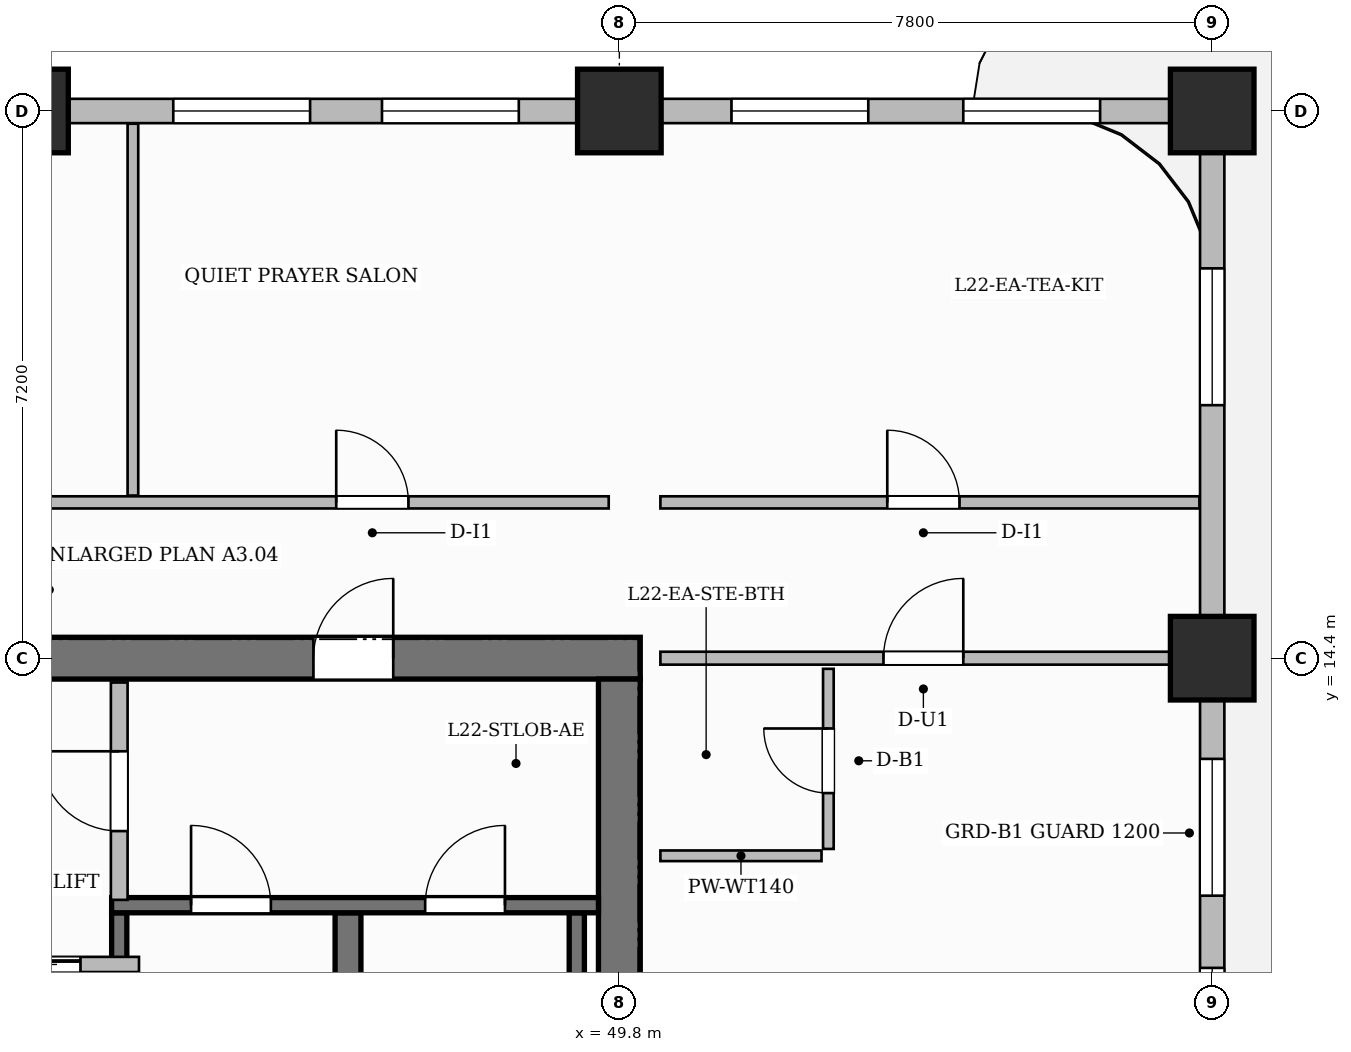
"""IFC4 building model, lengths in metres.
Left out: names, types, materials, properties, quantities, classifications, styles, units other than length and angle.
Written with IfcOpenShell. Run it as: python <this file> out.ifc"""

import sys

from ifc_helpers import new_model, si_unit, direction, frame, frame_2d, origin, origin_2d, place, context, subcontext, project, spatial, rectangle, extrude, source, transform, mapped, element, fill, save


model = new_model("IFC4")
c1 = context("Model", 3, precision=1e-05, world=origin(), true_north=direction((0.0, 1.0)))
c2 = subcontext(c1, "Body", "Model", "MODEL_VIEW")
j1 = project(units=[si_unit("LENGTHUNIT", "METRE"), si_unit("PLANEANGLEUNIT", "RADIAN")], contexts=[c1])
p1 = place(None, origin())
s1 = spatial("IfcSite", under=j1, at=p1, CompositionType="ELEMENT")
p2 = place(p1, origin())
s2 = spatial("IfcBuilding", under=s1, at=p2, CompositionType="ELEMENT")
p3 = place(p2, frame((0.0, 0.0, 91.6)))
s3 = spatial("IfcBuildingStorey", under=s2, at=p3, CompositionType="ELEMENT", Elevation=91.6)
p4 = place(p3, frame((34.525, 14.4, 0.0), z_axis=(0.0, 0.0, 1.0), x_axis=(1.0, 0.0, 0.0)))
e1 = element("IfcWall", 1, at=p4, inside=s3, PredefinedType="SHEAR", context=c2, shape_type="SweptSolid", body=[
    extrude(rectangle(XDim=15.55, YDim=0.55, at=frame_2d((7.775, 0.0))), origin(), (0.0, 0.0, 1.0), 3.7),
])
p5 = place(p4, frame((5.405, 0.0, 0.0)))
e2 = element("IfcOpeningElement", 2, at=p5, cuts=e1, PredefinedType="OPENING", context=c2, shape_type="SweptSolid", body=[
    extrude(rectangle(XDim=1.5, YDim=2.2, at=frame_2d((0.75, 1.1))), frame((0.0, 0.285, 0.0), z_axis=(0.0, -1.0, 0.0), x_axis=(1.0, 0.0, 0.0)), (0.0, 0.0, 1.0), 0.57),
])
p6 = place(p4, frame((1.62, 0.0, 0.0)))
e3 = element("IfcOpeningElement", 3, at=p6, cuts=e1, PredefinedType="OPENING", context=c2, shape_type="SweptSolid", body=[
    extrude(rectangle(XDim=1.05, YDim=2.15, at=frame_2d((0.525, 1.075))), frame((0.0, 0.285, 0.0), z_axis=(0.0, -1.0, 0.0), x_axis=(1.0, 0.0, 0.0)), (0.0, 0.0, 1.0), 0.57),
])
p7 = place(p4, frame((11.25, 0.0, 0.0)))
e4 = element("IfcOpeningElement", 4, at=p7, cuts=e1, PredefinedType="OPENING", context=c2, shape_type="SweptSolid", body=[
    extrude(rectangle(XDim=1.05, YDim=2.15, at=frame_2d((0.525, 1.075))), frame((0.0, 0.285, 0.0), z_axis=(0.0, -1.0, 0.0), x_axis=(1.0, 0.0, 0.0)), (0.0, 0.0, 1.0), 0.57),
])
p8 = place(p3, frame((49.8, 3.875, 0.0), z_axis=(0.0, 0.0, 1.0), x_axis=(0.0, 1.0, 0.0)))
e5 = element("IfcWall", 5, at=p8, inside=s3, PredefinedType="SHEAR", context=c2, shape_type="SweptSolid", body=[
    extrude(rectangle(XDim=10.25, YDim=0.55, at=frame_2d((5.125, 0.0))), origin(), (0.0, 0.0, 1.0), 3.7),
])
m1 = source(origin(), c2, "Body", "SweptSolid", [
    extrude(rectangle(XDim=1.1, YDim=1.1, at=origin_2d()), origin(), (0.0, 0.0, 1.0), 3.7),
])
for number, where, z_axis, x_axis in (
    (6, (42.0, 21.6, 0.0), (0.0, 0.0, 1.0), (1.0, 0.0, 0.0)),
    (7, (49.8, 21.6, 0.0), (0.0, 0.0, 1.0), (1.0, 0.0, 0.0)),
    (8, (57.6, 14.4, 0.0), (0.0, 0.0, 1.0), (1.0, 0.0, 0.0)),
    (9, (57.6, 21.6, 0.0), (0.0, 0.0, 1.0), (1.0, 0.0, 0.0)),
):
    element("IfcColumn", number, at=place(p3, frame(where, z_axis=z_axis, x_axis=x_axis)), inside=s3, PredefinedType="COLUMN", context=c2, shape_type="MappedRepresentation", body=[
        mapped(m1, transform((0.0, 0.0, 0.0), scale=1.0)),
    ])
p9 = place(p3, frame((43.22, 4.1, 0.0), z_axis=(0.0, 0.0, 1.0), x_axis=(0.0, 1.0, 0.0)))
e10 = element("IfcWall", 10, at=p9, inside=s3, PredefinedType="SHEAR", context=c2, shape_type="SweptSolid", body=[
    extrude(rectangle(XDim=6.95, YDim=0.2, at=frame_2d((3.475, 0.0))), origin(), (0.0, 0.0, 1.0), 3.7),
])
p10 = place(p3, frame((46.23, 4.1, 0.0), z_axis=(0.0, 0.0, 1.0), x_axis=(0.0, 1.0, 0.0)))
e11 = element("IfcWall", 11, at=p10, inside=s3, PredefinedType="SHEAR", context=c2, shape_type="SweptSolid", body=[
    extrude(rectangle(XDim=6.95, YDim=0.34, at=frame_2d((3.475, 0.0))), origin(), (0.0, 0.0, 1.0), 3.7),
])
p11 = place(p3, frame((49.24, 4.1, 0.0), z_axis=(0.0, 0.0, 1.0), x_axis=(0.0, 1.0, 0.0)))
e12 = element("IfcWall", 12, at=p11, inside=s3, PredefinedType="SHEAR", context=c2, shape_type="SweptSolid", body=[
    extrude(rectangle(XDim=6.95, YDim=0.2, at=frame_2d((3.475, 0.0))), origin(), (0.0, 0.0, 1.0), 3.7),
])
p12 = place(p3, frame((43.12, 11.15, 0.0), z_axis=(0.0, 0.0, 1.0), x_axis=(1.0, 0.0, 0.0)))
e13 = element("IfcWall", 13, at=p12, inside=s3, PredefinedType="SHEAR", context=c2, shape_type="SweptSolid", body=[
    extrude(rectangle(XDim=6.405, YDim=0.2, at=frame_2d((3.202, 0.0))), origin(), (0.0, 0.0, 1.0), 3.7),
])
p13 = place(p12, frame((1.045, 0.0, 0.0)))
e14 = element("IfcOpeningElement", 14, at=p13, cuts=e13, PredefinedType="OPENING", context=c2, shape_type="SweptSolid", body=[
    extrude(rectangle(XDim=1.05, YDim=2.2, at=frame_2d((0.525, 1.1))), frame((0.0, 0.11, 0.0), z_axis=(0.0, -1.0, 0.0), x_axis=(1.0, 0.0, 0.0)), (0.0, 0.0, 1.0), 0.22),
])
p14 = place(p12, frame((4.125, 0.0, 0.0)))
e15 = element("IfcOpeningElement", 15, at=p14, cuts=e13, PredefinedType="OPENING", context=c2, shape_type="SweptSolid", body=[
    extrude(rectangle(XDim=1.05, YDim=2.2, at=frame_2d((0.525, 1.1))), frame((0.0, 0.11, 0.0), z_axis=(0.0, -1.0, 0.0), x_axis=(1.0, 0.0, 0.0)), (0.0, 0.0, 1.0), 0.22),
])
p15 = place(p3, frame((43.22, 11.22, 0.0), z_axis=(0.0, 0.0, 1.0), x_axis=(0.0, 1.0, 0.0)))
e16 = element("IfcWall", 16, at=p15, inside=s3, PredefinedType="PARTITIONING", context=c2, shape_type="SweptSolid", body=[
    extrude(rectangle(XDim=2.86, YDim=0.22, at=frame_2d((1.43, 0.0))), origin(), (0.0, 0.0, 1.0), 3.45),
])
p16 = place(p15, frame((0.905, 0.0, 0.0)))
e17 = element("IfcOpeningElement", 17, at=p16, cuts=e16, PredefinedType="OPENING", context=c2, shape_type="SweptSolid", body=[
    extrude(rectangle(XDim=1.05, YDim=2.15, at=frame_2d((0.525, 1.075))), frame((0.0, 0.12, 0.0), z_axis=(0.0, -1.0, 0.0), x_axis=(1.0, 0.0, 0.0)), (0.0, 0.0, 1.0), 0.24),
])
p17 = place(p3, frame((32.19, 16.45, 0.0), z_axis=(0.0, 0.0, 1.0), x_axis=(1.0, 0.0, 0.0)))
e18 = element("IfcWall", 18, at=p17, inside=s3, PredefinedType="PARTITIONING", context=c2, shape_type="SweptSolid", body=[
    extrude(rectangle(XDim=17.47, YDim=0.16, at=frame_2d((8.735, 0.0))), origin(), (0.0, 0.0, 1.0), 3.45),
])
p18 = place(p17, frame((1.235, 0.0, 0.0)))
e19 = element("IfcOpeningElement", 19, at=p18, cuts=e18, PredefinedType="OPENING", context=c2, shape_type="SweptSolid", body=[
    extrude(rectangle(XDim=0.85, YDim=2.1, at=frame_2d((0.425, 1.05))), frame((0.0, 0.09, 0.0), z_axis=(0.0, -1.0, 0.0), x_axis=(1.0, 0.0, 0.0)), (0.0, 0.0, 1.0), 0.18),
])
p19 = place(p17, frame((6.61, 0.0, 0.0)))
e20 = element("IfcOpeningElement", 20, at=p19, cuts=e18, PredefinedType="OPENING", context=c2, shape_type="SweptSolid", body=[
    extrude(rectangle(XDim=1.4, YDim=2.35, at=frame_2d((0.7, 1.175))), frame((0.0, 0.09, 0.0), z_axis=(0.0, -1.0, 0.0), x_axis=(1.0, 0.0, 0.0)), (0.0, 0.0, 1.0), 0.18),
])
p20 = place(p17, frame((13.885, 0.0, 0.0)))
e21 = element("IfcOpeningElement", 21, at=p20, cuts=e18, PredefinedType="OPENING", context=c2, shape_type="SweptSolid", body=[
    extrude(rectangle(XDim=0.95, YDim=2.15, at=frame_2d((0.475, 1.075))), frame((0.0, 0.09, 0.0), z_axis=(0.0, -1.0, 0.0), x_axis=(1.0, 0.0, 0.0)), (0.0, 0.0, 1.0), 0.18),
])
p21 = place(p3, frame((50.34, 14.4, 0.0), z_axis=(0.0, 0.0, 1.0), x_axis=(1.0, 0.0, 0.0)))
e22 = element("IfcWall", 22, at=p21, inside=s3, PredefinedType="PARTITIONING", context=c2, shape_type="SweptSolid", body=[
    extrude(rectangle(XDim=7.07, YDim=0.17, at=frame_2d((3.535, 0.0))), origin(), (0.0, 0.0, 1.0), 2.885),
])
p22 = place(p21, frame((2.935, 0.0, 0.0)))
e23 = element("IfcOpeningElement", 23, at=p22, cuts=e22, PredefinedType="OPENING", context=c2, shape_type="SweptSolid", body=[
    extrude(rectangle(XDim=1.05, YDim=2.25, at=frame_2d((0.525, 1.125))), frame((0.0, 0.095, 0.0), z_axis=(0.0, -1.0, 0.0), x_axis=(1.0, 0.0, 0.0)), (0.0, 0.0, 1.0), 0.19),
])
p23 = place(p3, frame((50.34, 16.45, 0.0), z_axis=(0.0, 0.0, 1.0), x_axis=(1.0, 0.0, 0.0)))
e24 = element("IfcWall", 24, at=p23, inside=s3, PredefinedType="PARTITIONING", context=c2, shape_type="SweptSolid", body=[
    extrude(rectangle(XDim=7.092, YDim=0.16, at=frame_2d((3.546, 0.0))), origin(), (0.0, 0.0, 1.0), 3.45),
])
p24 = place(p23, frame((2.985, 0.0, 0.0)))
e25 = element("IfcOpeningElement", 25, at=p24, cuts=e24, PredefinedType="OPENING", context=c2, shape_type="SweptSolid", body=[
    extrude(rectangle(XDim=0.95, YDim=2.15, at=frame_2d((0.475, 1.075))), frame((0.0, 0.09, 0.0), z_axis=(0.0, -1.0, 0.0), x_axis=(1.0, 0.0, 0.0)), (0.0, 0.0, 1.0), 0.18),
])
p25 = place(p3, frame((52.55, 11.89, 0.0), z_axis=(0.0, 0.0, 1.0), x_axis=(0.0, 1.0, 0.0)))
e26 = element("IfcWall", 26, at=p25, inside=s3, PredefinedType="PARTITIONING", context=c2, shape_type="SweptSolid", body=[
    extrude(rectangle(XDim=2.37, YDim=0.14, at=frame_2d((1.185, 0.0))), origin(), (0.0, 0.0, 1.0), 3.45),
])
p26 = place(p25, frame((0.735, 0.0, 0.0)))
e27 = element("IfcOpeningElement", 27, at=p26, cuts=e26, PredefinedType="OPENING", context=c2, shape_type="SweptSolid", body=[
    extrude(rectangle(XDim=0.85, YDim=2.1, at=frame_2d((0.425, 1.05))), frame((0.0, 0.08, 0.0), z_axis=(0.0, -1.0, 0.0), x_axis=(1.0, 0.0, 0.0)), (0.0, 0.0, 1.0), 0.16),
])
p27 = place(p3, frame((50.34, 11.8, 0.0), z_axis=(0.0, 0.0, 1.0), x_axis=(1.0, 0.0, 0.0)))
e28 = element("IfcWall", 28, at=p27, inside=s3, PredefinedType="PARTITIONING", context=c2, shape_type="SweptSolid", body=[
    extrude(rectangle(XDim=2.12, YDim=0.14, at=frame_2d((1.06, 0.0))), origin(), (0.0, 0.0, 1.0), 3.45),
])
p28 = place(p3, frame((43.4, 16.54, 0.0), z_axis=(0.0, 0.0, 1.0), x_axis=(0.0, 1.0, 0.0)))
e29 = element("IfcWall", 29, at=p28, inside=s3, PredefinedType="PARTITIONING", context=c2, shape_type="SweptSolid", body=[
    extrude(rectangle(XDim=4.892, YDim=0.14, at=frame_2d((2.446, 0.0))), origin(), (0.0, 0.0, 1.0), 3.45),
])
p29 = place(p3, frame((40.84, 10.37, 0.0), z_axis=(0.0, 0.0, 1.0), x_axis=(1.0, 0.0, 0.0)))
e30 = element("IfcWall", 30, at=p29, inside=s3, PredefinedType="PARTITIONING", context=c2, shape_type="SweptSolid", body=[
    extrude(rectangle(XDim=2.64, YDim=0.2, at=frame_2d((1.32, 0.0))), origin(), (0.0, 0.0, 1.0), 3.45),
])
p30 = place(p29, frame((0.77, 0.0, 0.0)))
e31 = element("IfcOpeningElement", 31, at=p30, cuts=e30, PredefinedType="OPENING", context=c2, shape_type="SweptSolid", body=[
    extrude(rectangle(XDim=1.1, YDim=2.2, at=frame_2d((0.55, 1.1))), frame((0.0, 0.11, 0.0), z_axis=(0.0, -1.0, 0.0), x_axis=(1.0, 0.0, 0.0)), (0.0, 0.0, 1.0), 0.22),
])
p31 = place(p3, frame((57.6, 0.05, 0.0), z_axis=(0.0, 0.0, 1.0), x_axis=(0.0, 1.0, 0.0)))
e32 = element("IfcWall", 32, at=p31, inside=s3, PredefinedType="SOLIDWALL", context=c2, shape_type="SweptSolid", body=[
    extrude(rectangle(XDim=21.5, YDim=0.32, at=frame_2d((10.75, 0.0))), origin(), (0.0, 0.0, 1.0), 2.885),
])
p32 = place(p31, frame((3.4, 0.0, 0.0)))
e33 = element("IfcOpeningElement", 33, at=p32, cuts=e32, PredefinedType="OPENING", context=c2, shape_type="SweptSolid", body=[
    extrude(rectangle(XDim=1.2, YDim=2.2, at=frame_2d((0.6, 1.1))), frame((0.0, 0.17, 0.0), z_axis=(0.0, -1.0, 0.0), x_axis=(1.0, 0.0, 0.0)), (0.0, 0.0, 1.0), 0.34),
])
p33 = place(p31, frame((1.225, 0.0, 0.8)))
e34 = element("IfcOpeningElement", 34, at=p33, cuts=e32, PredefinedType="OPENING", context=c2, shape_type="SweptSolid", body=[
    extrude(rectangle(XDim=1.4, YDim=1.85, at=frame_2d((0.7, 0.925))), frame((0.0, 0.17, 0.0), z_axis=(0.0, -1.0, 0.0), x_axis=(1.0, 0.0, 0.0)), (0.0, 0.0, 1.0), 0.34),
])
p34 = place(p31, frame((5.15, 0.0, 0.8)))
e35 = element("IfcOpeningElement", 35, at=p34, cuts=e32, PredefinedType="OPENING", context=c2, shape_type="SweptSolid", body=[
    extrude(rectangle(XDim=0.95, YDim=1.75, at=frame_2d((0.475, 0.875))), frame((0.0, 0.17, 0.0), z_axis=(0.0, -1.0, 0.0), x_axis=(1.0, 0.0, 0.0)), (0.0, 0.0, 1.0), 0.34),
])
p35 = place(p31, frame((8.475, 0.0, 0.8)))
e36 = element("IfcOpeningElement", 36, at=p35, cuts=e32, PredefinedType="OPENING", context=c2, shape_type="SweptSolid", body=[
    extrude(rectangle(XDim=1.8, YDim=1.85, at=frame_2d((0.9, 0.925))), frame((0.0, 0.17, 0.0), z_axis=(0.0, -1.0, 0.0), x_axis=(1.0, 0.0, 0.0)), (0.0, 0.0, 1.0), 0.34),
])
p36 = place(p31, frame((11.225, 0.0, 0.8)))
e37 = element("IfcOpeningElement", 37, at=p36, cuts=e32, PredefinedType="OPENING", context=c2, shape_type="SweptSolid", body=[
    extrude(rectangle(XDim=1.8, YDim=1.85, at=frame_2d((0.9, 0.925))), frame((0.0, 0.17, 0.0), z_axis=(0.0, -1.0, 0.0), x_axis=(1.0, 0.0, 0.0)), (0.0, 0.0, 1.0), 0.34),
])
p37 = place(p31, frame((17.679, 0.0, 0.8)))
e38 = element("IfcOpeningElement", 38, at=p37, cuts=e32, PredefinedType="OPENING", context=c2, shape_type="SweptSolid", body=[
    extrude(rectangle(XDim=1.8, YDim=1.85, at=frame_2d((0.9, 0.925))), frame((0.0, 0.17, 0.0), z_axis=(0.0, -1.0, 0.0), x_axis=(1.0, 0.0, 0.0)), (0.0, 0.0, 1.0), 0.34),
])
p38 = place(p3, frame((34.8, 21.6, 0.0), z_axis=(0.0, 0.0, 1.0), x_axis=(1.0, 0.0, 0.0)))
e39 = element("IfcWall", 39, at=p38, inside=s3, PredefinedType="SOLIDWALL", context=c2, shape_type="SweptSolid", body=[
    extrude(rectangle(XDim=22.8, YDim=0.32, at=frame_2d((11.4, 0.0))), origin(), (0.0, 0.0, 1.0), 2.885),
])
p39 = place(p38, frame((1.331, 0.0, 0.8)))
e40 = element("IfcOpeningElement", 40, at=p39, cuts=e39, PredefinedType="OPENING", context=c2, shape_type="SweptSolid", body=[
    extrude(rectangle(XDim=1.8, YDim=1.85, at=frame_2d((0.9, 0.925))), frame((0.0, 0.17, 0.0), z_axis=(0.0, -1.0, 0.0), x_axis=(1.0, 0.0, 0.0)), (0.0, 0.0, 1.0), 0.34),
])
p40 = place(p38, frame((4.077, 0.0, 0.8)))
e41 = element("IfcOpeningElement", 41, at=p40, cuts=e39, PredefinedType="OPENING", context=c2, shape_type="SweptSolid", body=[
    extrude(rectangle(XDim=1.8, YDim=1.85, at=frame_2d((0.9, 0.925))), frame((0.0, 0.17, 0.0), z_axis=(0.0, -1.0, 0.0), x_axis=(1.0, 0.0, 0.0)), (0.0, 0.0, 1.0), 0.34),
])
p41 = place(p38, frame((9.131, 0.0, 0.8)))
e42 = element("IfcOpeningElement", 42, at=p41, cuts=e39, PredefinedType="OPENING", context=c2, shape_type="SweptSolid", body=[
    extrude(rectangle(XDim=1.8, YDim=1.85, at=frame_2d((0.9, 0.925))), frame((0.0, 0.17, 0.0), z_axis=(0.0, -1.0, 0.0), x_axis=(1.0, 0.0, 0.0)), (0.0, 0.0, 1.0), 0.34),
])
p42 = place(p38, frame((11.877, 0.0, 0.8)))
e43 = element("IfcOpeningElement", 43, at=p42, cuts=e39, PredefinedType="OPENING", context=c2, shape_type="SweptSolid", body=[
    extrude(rectangle(XDim=1.8, YDim=1.85, at=frame_2d((0.9, 0.925))), frame((0.0, 0.17, 0.0), z_axis=(0.0, -1.0, 0.0), x_axis=(1.0, 0.0, 0.0)), (0.0, 0.0, 1.0), 0.34),
])
p43 = place(p38, frame((16.475, 0.0, 0.8)))
e44 = element("IfcOpeningElement", 44, at=p43, cuts=e39, PredefinedType="OPENING", context=c2, shape_type="SweptSolid", body=[
    extrude(rectangle(XDim=1.8, YDim=1.85, at=frame_2d((0.9, 0.925))), frame((0.0, 0.17, 0.0), z_axis=(0.0, -1.0, 0.0), x_axis=(1.0, 0.0, 0.0)), (0.0, 0.0, 1.0), 0.34),
])
p44 = place(p38, frame((19.525, 0.0, 0.8)))
e45 = element("IfcOpeningElement", 45, at=p44, cuts=e39, PredefinedType="OPENING", context=c2, shape_type="SweptSolid", body=[
    extrude(rectangle(XDim=1.8, YDim=1.85, at=frame_2d((0.9, 0.925))), frame((0.0, 0.17, 0.0), z_axis=(0.0, -1.0, 0.0), x_axis=(1.0, 0.0, 0.0)), (0.0, 0.0, 1.0), 0.34),
])
m2 = source(origin(), c2, "Body", "SweptSolid", [
    extrude(rectangle(XDim=1.05, YDim=2.2, at=frame_2d((0.525, 1.1))), frame((0.0, 0.025, 0.0), z_axis=(0.0, -1.0, 0.0), x_axis=(1.0, 0.0, 0.0)), (0.0, 0.0, 1.0), 0.05),
])
p45 = place(p13, origin())
e46 = element("IfcDoor", 46, at=p45, inside=s3, OperationType="SINGLE_SWING_LEFT", PredefinedType="DOOR", context=c2, shape_type="MappedRepresentation", body=[
    mapped(m2, transform((0.0, 0.0, 0.0), scale=1.0)),
])
fill(e14, e46)
p46 = place(p14, origin())
e47 = element("IfcDoor", 47, at=p46, inside=s3, OperationType="SINGLE_SWING_RIGHT", PredefinedType="DOOR", context=c2, shape_type="MappedRepresentation", body=[
    mapped(m2, transform((0.0, 0.0, 0.0), scale=1.0)),
])
fill(e15, e47)
m3 = source(origin(), c2, "Body", "SweptSolid", [
    extrude(rectangle(XDim=1.05, YDim=2.15, at=frame_2d((0.525, 1.075))), frame((0.0, 0.025, 0.0), z_axis=(0.0, -1.0, 0.0), x_axis=(1.0, 0.0, 0.0)), (0.0, 0.0, 1.0), 0.05),
])
p47 = place(p16, origin())
e48 = element("IfcDoor", 48, at=p47, inside=s3, OperationType="SINGLE_SWING_RIGHT", PredefinedType="DOOR", context=c2, shape_type="MappedRepresentation", body=[
    mapped(m3, transform((0.0, 0.0, 0.0), scale=1.0)),
])
fill(e17, e48)
p48 = place(p7, origin())
e49 = element("IfcDoor", 49, at=p48, inside=s3, OperationType="SINGLE_SWING_RIGHT", PredefinedType="DOOR", context=c2, shape_type="MappedRepresentation", body=[
    mapped(m3, transform((0.0, 0.0, 0.0), scale=1.0)),
])
fill(e4, e49)
m4 = source(origin(), c2, "Body", "SweptSolid", [
    extrude(rectangle(XDim=1.05, YDim=2.25, at=frame_2d((0.525, 1.125))), frame((0.0, 0.025, 0.0), z_axis=(0.0, -1.0, 0.0), x_axis=(1.0, 0.0, 0.0)), (0.0, 0.0, 1.0), 0.05),
])
p49 = place(p22, origin())
e50 = element("IfcDoor", 50, at=p49, inside=s3, OperationType="SINGLE_SWING_RIGHT", PredefinedType="DOOR", context=c2, shape_type="MappedRepresentation", body=[
    mapped(m4, transform((0.0, 0.0, 0.0), scale=1.0)),
])
fill(e23, e50)
m5 = source(origin(), c2, "Body", "SweptSolid", [
    extrude(rectangle(XDim=0.95, YDim=2.15, at=frame_2d((0.475, 1.075))), frame((0.0, 0.025, 0.0), z_axis=(0.0, -1.0, 0.0), x_axis=(1.0, 0.0, 0.0)), (0.0, 0.0, 1.0), 0.05),
])
p50 = place(p24, origin())
e51 = element("IfcDoor", 51, at=p50, inside=s3, OperationType="SINGLE_SWING_LEFT", PredefinedType="DOOR", context=c2, shape_type="MappedRepresentation", body=[
    mapped(m5, transform((0.0, 0.0, 0.0), scale=1.0)),
])
fill(e25, e51)
m6 = source(origin(), c2, "Body", "SweptSolid", [
    extrude(rectangle(XDim=0.85, YDim=2.1, at=frame_2d((0.425, 1.05))), frame((0.0, 0.025, 0.0), z_axis=(0.0, -1.0, 0.0), x_axis=(1.0, 0.0, 0.0)), (0.0, 0.0, 1.0), 0.05),
])
p51 = place(p26, origin())
e52 = element("IfcDoor", 52, at=p51, inside=s3, OperationType="SINGLE_SWING_RIGHT", PredefinedType="DOOR", context=c2, shape_type="MappedRepresentation", body=[
    mapped(m6, transform((0.0, 0.0, 0.0), scale=1.0)),
])
fill(e27, e52)
p52 = place(p20, origin())
e53 = element("IfcDoor", 53, at=p52, inside=s3, OperationType="SINGLE_SWING_LEFT", PredefinedType="DOOR", context=c2, shape_type="MappedRepresentation", body=[
    mapped(m5, transform((0.0, 0.0, 0.0), scale=1.0)),
])
fill(e21, e53)
m7 = source(origin(), c2, "Body", "SweptSolid", [
    extrude(rectangle(XDim=1.1, YDim=2.2, at=frame_2d((0.55, 1.1))), frame((0.0, 0.025, 0.0), z_axis=(0.0, -1.0, 0.0), x_axis=(1.0, 0.0, 0.0)), (0.0, 0.0, 1.0), 0.05),
])
p53 = place(p30, origin())
e54 = element("IfcDoor", 54, at=p53, inside=s3, OperationType="SLIDING_TO_LEFT", PredefinedType="DOOR", context=c2, shape_type="MappedRepresentation", body=[
    mapped(m7, transform((0.0, 0.0, 0.0), scale=1.0)),
])
fill(e31, e54)
m8 = source(origin(), c2, "Body", "SweptSolid", [
    extrude(rectangle(XDim=1.8, YDim=1.85, at=frame_2d((0.9, 0.925))), frame((0.0, 0.03, 0.0), z_axis=(0.0, -1.0, 0.0), x_axis=(1.0, 0.0, 0.0)), (0.0, 0.0, 1.0), 0.06),
])
p54 = place(p35, origin())
e55 = element("IfcWindow", 55, at=p54, inside=s3, PartitioningType="DOUBLE_PANEL_VERTICAL", PredefinedType="WINDOW", context=c2, shape_type="MappedRepresentation", body=[
    mapped(m8, transform((0.0, 0.0, 0.0), scale=1.0)),
])
fill(e36, e55)
p55 = place(p36, origin())
e56 = element("IfcWindow", 56, at=p55, inside=s3, PartitioningType="DOUBLE_PANEL_VERTICAL", PredefinedType="WINDOW", context=c2, shape_type="MappedRepresentation", body=[
    mapped(m8, transform((0.0, 0.0, 0.0), scale=1.0)),
])
fill(e37, e56)
p56 = place(p37, origin())
e57 = element("IfcWindow", 57, at=p56, inside=s3, PartitioningType="DOUBLE_PANEL_VERTICAL", PredefinedType="WINDOW", context=c2, shape_type="MappedRepresentation", body=[
    mapped(m8, transform((0.0, 0.0, 0.0), scale=1.0)),
])
fill(e38, e57)
p57 = place(p41, origin())
e58 = element("IfcWindow", 58, at=p57, inside=s3, PartitioningType="DOUBLE_PANEL_VERTICAL", PredefinedType="WINDOW", context=c2, shape_type="MappedRepresentation", body=[
    mapped(m8, transform((0.0, 0.0, 0.0), scale=1.0)),
])
fill(e42, e58)
p58 = place(p42, origin())
e59 = element("IfcWindow", 59, at=p58, inside=s3, PartitioningType="DOUBLE_PANEL_VERTICAL", PredefinedType="WINDOW", context=c2, shape_type="MappedRepresentation", body=[
    mapped(m8, transform((0.0, 0.0, 0.0), scale=1.0)),
])
fill(e43, e59)
p59 = place(p43, origin())
e60 = element("IfcWindow", 60, at=p59, inside=s3, PartitioningType="DOUBLE_PANEL_VERTICAL", PredefinedType="WINDOW", context=c2, shape_type="MappedRepresentation", body=[
    mapped(m8, transform((0.0, 0.0, 0.0), scale=1.0)),
])
fill(e44, e60)
p60 = place(p44, origin())
e61 = element("IfcWindow", 61, at=p60, inside=s3, PartitioningType="DOUBLE_PANEL_VERTICAL", PredefinedType="WINDOW", context=c2, shape_type="MappedRepresentation", body=[
    mapped(m8, transform((0.0, 0.0, 0.0), scale=1.0)),
])
fill(e45, e61)
save(model, sys.argv[1])
